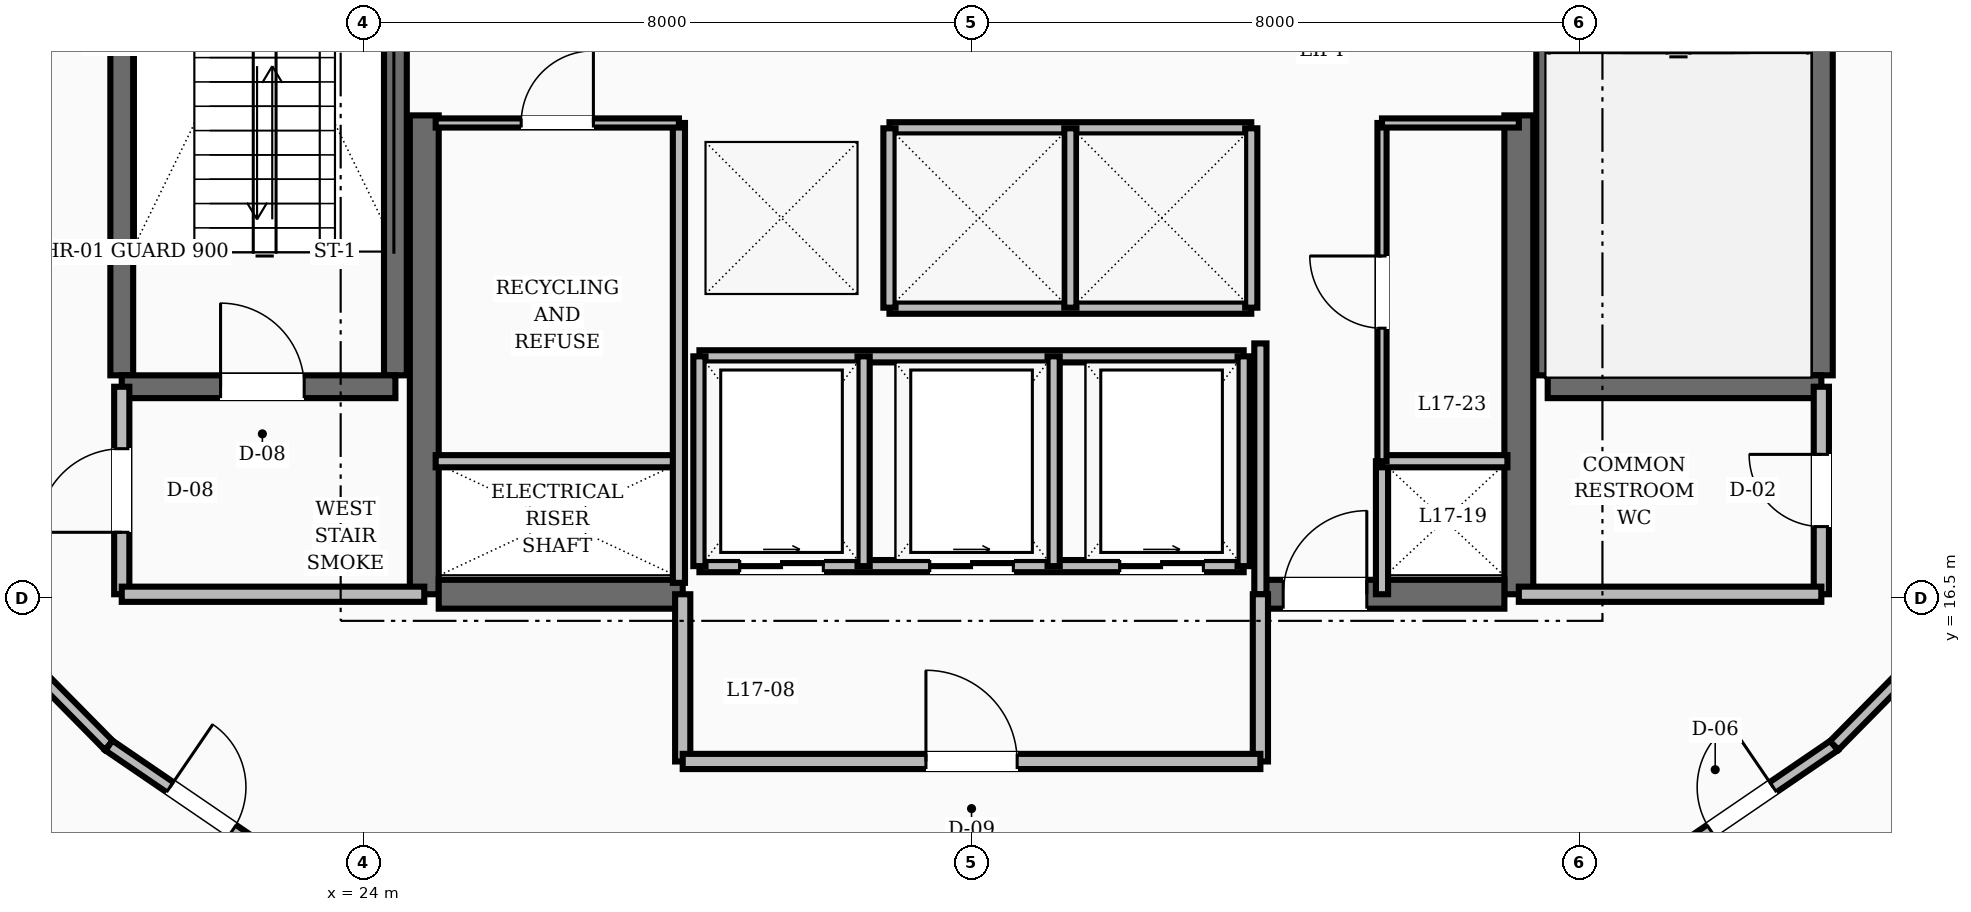
"""IFC4 building model, lengths in metres.
Left out: names, types, materials, properties, quantities, classifications, styles, units other than length and angle.
Written with IfcOpenShell. Run it as: python <this file> out.ifc"""

import sys

from ifc_helpers import new_model, si_unit, direction, frame, frame_2d, origin, place, context, subcontext, project, spatial, rectangle, extrude, element, fill, save


model = new_model("IFC4")
c1 = context("Model", 3, precision=1e-05, world=origin(), true_north=direction((0.0, 1.0)))
c2 = subcontext(c1, "Body", "Model", "MODEL_VIEW")
j1 = project(units=[si_unit("LENGTHUNIT", "METRE"), si_unit("PLANEANGLEUNIT", "RADIAN")], contexts=[c1])
p1 = place(None, origin())
s1 = spatial("IfcSite", under=j1, at=p1, CompositionType="ELEMENT")
p2 = place(p1, origin())
s2 = spatial("IfcBuilding", under=s1, at=p2, CompositionType="ELEMENT")
p3 = place(p2, frame((0.0, 0.0, 70.0)))
s3 = spatial("IfcBuildingStorey", under=s2, at=p3, CompositionType="ELEMENT", Elevation=70.0)
for number, where, z_axis, x_axis in (
    (1, (24.8, 16.55, 0.0), (0.0, 0.0, 1.0), (0.0, 1.0, 0.0)),
    (2, (39.2, 16.55, 0.0), (0.0, 0.0, 1.0), (0.0, 1.0, 0.0)),
):
    element("IfcWall", number, at=place(p3, frame(where, z_axis=z_axis, x_axis=x_axis)), inside=s3, PredefinedType="SHEAR", context=c2, shape_type="SweptSolid", body=[
        extrude(rectangle(XDim=6.3, YDim=0.38, at=frame_2d((3.15, 0.0))), origin(), (0.0, 0.0, 1.0), 3.6),
    ])
p4 = place(p3, frame((24.99, 16.55, 0.0), z_axis=(0.0, 0.0, 1.0), x_axis=(1.0, 0.0, 0.0)))
e3 = element("IfcWall", 3, at=p4, inside=s3, PredefinedType="SHEAR", context=c2, shape_type="SweptSolid", body=[
    extrude(rectangle(XDim=3.21, YDim=0.38, at=frame_2d((1.605, 0.0))), origin(), (0.0, 0.0, 1.0), 3.6),
])
p5 = place(p3, frame((35.8, 16.55, 0.0), z_axis=(0.0, 0.0, 1.0), x_axis=(1.0, 0.0, 0.0)))
e4 = element("IfcWall", 4, at=p5, inside=s3, PredefinedType="SHEAR", context=c2, shape_type="SweptSolid", body=[
    extrude(rectangle(XDim=3.21, YDim=0.38, at=frame_2d((1.605, 0.0))), origin(), (0.0, 0.0, 1.0), 3.6),
])
p6 = place(p5, frame((0.3, 0.0, 0.0)))
e5 = element("IfcOpeningElement", 5, at=p6, cuts=e4, PredefinedType="OPENING", context=c2, shape_type="SweptSolid", body=[
    extrude(rectangle(XDim=1.1, YDim=2.1, at=frame_2d((0.55, 1.05))), frame((0.0, 0.2, 0.0), z_axis=(0.0, -1.0, 0.0), x_axis=(1.0, 0.0, 0.0)), (0.0, 0.0, 1.0), 0.4),
])
for number, where, z_axis, x_axis in (
    (6, (20.82, 19.43, 0.0), (0.0, 0.0, 1.0), (0.0, 1.0, 0.0)),
    (7, (24.42, 19.43, 0.0), (0.0, 0.0, 1.0), (0.0, 1.0, 0.0)),
):
    element("IfcWall", number, at=place(p3, frame(where, z_axis=z_axis, x_axis=x_axis)), inside=s3, PredefinedType="SHEAR", context=c2, shape_type="SweptSolid", body=[
        extrude(rectangle(XDim=8.74, YDim=0.3, at=frame_2d((4.37, 0.0))), origin(), (0.0, 0.0, 1.0), 3.6),
    ])
p7 = place(p3, frame((20.82, 19.28, 0.0), z_axis=(0.0, 0.0, 1.0), x_axis=(1.0, 0.0, 0.0)))
e8 = element("IfcWall", 8, at=p7, inside=s3, PredefinedType="SHEAR", context=c2, shape_type="SweptSolid", body=[
    extrude(rectangle(XDim=3.6, YDim=0.3, at=frame_2d((1.8, 0.0))), origin(), (0.0, 0.0, 1.0), 3.6),
])
p8 = place(p7, frame((1.3, 0.0, 0.0)))
e9 = element("IfcOpeningElement", 9, at=p8, cuts=e8, PredefinedType="OPENING", context=c2, shape_type="SweptSolid", body=[
    extrude(rectangle(XDim=1.1, YDim=2.1, at=frame_2d((0.55, 1.05))), frame((0.0, 0.16, 0.0), z_axis=(0.0, -1.0, 0.0), x_axis=(1.0, 0.0, 0.0)), (0.0, 0.0, 1.0), 0.32),
])
for number, where, z_axis, x_axis in (
    (10, (43.18, 19.43, 0.0), (0.0, 0.0, 1.0), (0.0, 1.0, 0.0)),
    (11, (39.58, 19.43, 0.0), (0.0, 0.0, 1.0), (0.0, 1.0, 0.0)),
):
    element("IfcWall", number, at=place(p3, frame(where, z_axis=z_axis, x_axis=x_axis)), inside=s3, PredefinedType="SHEAR", context=c2, shape_type="SweptSolid", body=[
        extrude(rectangle(XDim=8.74, YDim=0.3, at=frame_2d((4.37, 0.0))), origin(), (0.0, 0.0, 1.0), 3.6),
    ])
p9 = place(p3, frame((39.58, 19.28, 0.0), z_axis=(0.0, 0.0, 1.0), x_axis=(1.0, 0.0, 0.0)))
e12 = element("IfcWall", 12, at=p9, inside=s3, PredefinedType="SHEAR", context=c2, shape_type="SweptSolid", body=[
    extrude(rectangle(XDim=3.6, YDim=0.3, at=frame_2d((1.8, 0.0))), origin(), (0.0, 0.0, 1.0), 3.6),
])
p10 = place(p3, frame((20.82, 16.55, 0.0), z_axis=(0.0, 0.0, 1.0), x_axis=(0.0, 1.0, 0.0)))
e13 = element("IfcWall", 13, at=p10, inside=s3, PredefinedType="SOLIDWALL", context=c2, shape_type="SweptSolid", body=[
    extrude(rectangle(XDim=2.73, YDim=0.2, at=frame_2d((1.365, 0.0))), origin(), (0.0, 0.0, 1.0), 2.71),
])
p11 = place(p10, frame((0.815, 0.0, 0.0)))
e14 = element("IfcOpeningElement", 14, at=p11, cuts=e13, PredefinedType="OPENING", context=c2, shape_type="SweptSolid", body=[
    extrude(rectangle(XDim=1.1, YDim=2.1, at=frame_2d((0.55, 1.05))), frame((0.0, 0.11, 0.0), z_axis=(0.0, -1.0, 0.0), x_axis=(1.0, 0.0, 0.0)), (0.0, 0.0, 1.0), 0.22),
])
p12 = place(p3, frame((20.82, 16.55, 0.0), z_axis=(0.0, 0.0, 1.0), x_axis=(1.0, 0.0, 0.0)))
e15 = element("IfcWall", 15, at=p12, inside=s3, PredefinedType="SOLIDWALL", context=c2, shape_type="SweptSolid", body=[
    extrude(rectangle(XDim=3.98, YDim=0.2, at=frame_2d((1.99, 0.0))), origin(), (0.0, 0.0, 1.0), 2.71),
])
p13 = place(p3, frame((43.18, 16.55, 0.0), z_axis=(0.0, 0.0, 1.0), x_axis=(0.0, 1.0, 0.0)))
e16 = element("IfcWall", 16, at=p13, inside=s3, PredefinedType="SOLIDWALL", context=c2, shape_type="SweptSolid", body=[
    extrude(rectangle(XDim=2.73, YDim=0.2, at=frame_2d((1.365, 0.0))), origin(), (0.0, 0.0, 1.0), 2.71),
])
p14 = place(p13, frame((0.89, 0.0, 0.0)))
e17 = element("IfcOpeningElement", 17, at=p14, cuts=e16, PredefinedType="OPENING", context=c2, shape_type="SweptSolid", body=[
    extrude(rectangle(XDim=0.95, YDim=2.1, at=frame_2d((0.475, 1.05))), frame((0.0, 0.11, 0.0), z_axis=(0.0, -1.0, 0.0), x_axis=(1.0, 0.0, 0.0)), (0.0, 0.0, 1.0), 0.22),
])
p15 = place(p3, frame((39.2, 16.55, 0.0), z_axis=(0.0, 0.0, 1.0), x_axis=(1.0, 0.0, 0.0)))
e18 = element("IfcWall", 18, at=p15, inside=s3, PredefinedType="SOLIDWALL", context=c2, shape_type="SweptSolid", body=[
    extrude(rectangle(XDim=3.98, YDim=0.2, at=frame_2d((1.99, 0.0))), origin(), (0.0, 0.0, 1.0), 2.71),
])
p16 = place(p3, frame((35.8, 16.55, 0.0), z_axis=(0.0, 0.0, 1.0), x_axis=(0.0, 1.0, 0.0)))
e19 = element("IfcWall", 19, at=p16, inside=s3, PredefinedType="SOLIDWALL", context=c2, shape_type="SweptSolid", body=[
    extrude(rectangle(XDim=3.3, YDim=0.16, at=frame_2d((1.65, 0.0))), origin(), (0.0, 0.0, 1.0), 2.71),
])
p17 = place(p3, frame((37.4, 16.55, 0.0), z_axis=(0.0, 0.0, 1.0), x_axis=(0.0, 1.0, 0.0)))
e20 = element("IfcWall", 20, at=p17, inside=s3, PredefinedType="SOLIDWALL", context=c2, shape_type="SweptSolid", body=[
    extrude(rectangle(XDim=1.75, YDim=0.16, at=frame_2d((0.875, 0.0))), origin(), (0.0, 0.0, 1.0), 2.71),
])
for number, where, z_axis, x_axis in (
    (21, (28.2, 14.35, 0.0), (0.0, 0.0, 1.0), (0.0, 1.0, 0.0)),
    (22, (35.8, 14.35, 0.0), (0.0, 0.0, 1.0), (0.0, 1.0, 0.0)),
):
    element("IfcWall", number, at=place(p3, frame(where, z_axis=z_axis, x_axis=x_axis)), inside=s3, PredefinedType="SOLIDWALL", context=c2, shape_type="SweptSolid", body=[
        extrude(rectangle(XDim=2.2, YDim=0.2, at=frame_2d((1.1, 0.0))), origin(), (0.0, 0.0, 1.0), 2.71),
    ])
p18 = place(p3, frame((28.2, 14.35, 0.0), z_axis=(0.0, 0.0, 1.0), x_axis=(1.0, 0.0, 0.0)))
e23 = element("IfcWall", 23, at=p18, inside=s3, PredefinedType="SOLIDWALL", context=c2, shape_type="SweptSolid", body=[
    extrude(rectangle(XDim=7.6, YDim=0.2, at=frame_2d((3.8, 0.0))), origin(), (0.0, 0.0, 1.0), 2.71),
])
p19 = place(p18, frame((3.2, 0.0, 0.0)))
e24 = element("IfcOpeningElement", 24, at=p19, cuts=e23, PredefinedType="OPENING", context=c2, shape_type="SweptSolid", body=[
    extrude(rectangle(XDim=1.2, YDim=2.1, at=frame_2d((0.6, 1.05))), frame((0.0, 0.11, 0.0), z_axis=(0.0, -1.0, 0.0), x_axis=(1.0, 0.0, 0.0)), (0.0, 0.0, 1.0), 0.22),
])
for number, where, z_axis, x_axis in (
    (25, (30.92, 22.68, 0.0), (0.0, 0.0, 1.0), (1.0, 0.0, 0.0)),
    (26, (30.92, 20.32, 0.0), (0.0, 0.0, 1.0), (1.0, 0.0, 0.0)),
):
    element("IfcWall", number, at=place(p3, frame(where, z_axis=z_axis, x_axis=x_axis)), inside=s3, PredefinedType="SOLIDWALL", context=c2, shape_type="SweptSolid", body=[
        extrude(rectangle(XDim=4.76, YDim=0.16, at=frame_2d((2.38, 0.0))), origin(), (0.0, 0.0, 1.0), 2.71),
    ])
for number, where, z_axis, x_axis in (
    (27, (30.92, 20.32, 0.0), (0.0, 0.0, 1.0), (0.0, 1.0, 0.0)),
    (28, (33.3, 20.32, 0.0), (0.0, 0.0, 1.0), (0.0, 1.0, 0.0)),
    (29, (35.68, 20.32, 0.0), (0.0, 0.0, 1.0), (0.0, 1.0, 0.0)),
):
    element("IfcWall", number, at=place(p3, frame(where, z_axis=z_axis, x_axis=x_axis)), inside=s3, PredefinedType="SOLIDWALL", context=c2, shape_type="SweptSolid", body=[
        extrude(rectangle(XDim=2.36, YDim=0.16, at=frame_2d((1.18, 0.0))), origin(), (0.0, 0.0, 1.0), 2.71),
    ])
p20 = place(p3, frame((28.42, 16.92, 0.0), z_axis=(0.0, 0.0, 1.0), x_axis=(1.0, 0.0, 0.0)))
e30 = element("IfcWall", 30, at=p20, inside=s3, PredefinedType="SOLIDWALL", context=c2, shape_type="SweptSolid", body=[
    extrude(rectangle(XDim=7.16, YDim=0.16, at=frame_2d((3.58, 0.0))), origin(), (0.0, 0.0, 1.0), 2.71),
])
p21 = place(p20, frame((0.53, 0.0, 0.0)))
e31 = element("IfcOpeningElement", 31, at=p21, cuts=e30, PredefinedType="OPENING", context=c2, shape_type="SweptSolid", body=[
    extrude(rectangle(XDim=1.1, YDim=2.15, at=frame_2d((0.55, 1.075))), frame((0.0, 0.09, 0.0), z_axis=(0.0, -1.0, 0.0), x_axis=(1.0, 0.0, 0.0)), (0.0, 0.0, 1.0), 0.18),
])
p22 = place(p20, frame((3.03, 0.0, 0.0)))
e32 = element("IfcOpeningElement", 32, at=p22, cuts=e30, PredefinedType="OPENING", context=c2, shape_type="SweptSolid", body=[
    extrude(rectangle(XDim=1.1, YDim=2.15, at=frame_2d((0.55, 1.075))), frame((0.0, 0.09, 0.0), z_axis=(0.0, -1.0, 0.0), x_axis=(1.0, 0.0, 0.0)), (0.0, 0.0, 1.0), 0.18),
])
p23 = place(p20, frame((5.53, 0.0, 0.0)))
e33 = element("IfcOpeningElement", 33, at=p23, cuts=e30, PredefinedType="OPENING", context=c2, shape_type="SweptSolid", body=[
    extrude(rectangle(XDim=1.1, YDim=2.15, at=frame_2d((0.55, 1.075))), frame((0.0, 0.09, 0.0), z_axis=(0.0, -1.0, 0.0), x_axis=(1.0, 0.0, 0.0)), (0.0, 0.0, 1.0), 0.18),
])
p24 = place(p3, frame((28.42, 19.68, 0.0), z_axis=(0.0, 0.0, 1.0), x_axis=(1.0, 0.0, 0.0)))
e34 = element("IfcWall", 34, at=p24, inside=s3, PredefinedType="SOLIDWALL", context=c2, shape_type="SweptSolid", body=[
    extrude(rectangle(XDim=7.16, YDim=0.16, at=frame_2d((3.58, 0.0))), origin(), (0.0, 0.0, 1.0), 2.71),
])
for number, where, z_axis, x_axis in (
    (35, (28.42, 16.92, 0.0), (0.0, 0.0, 1.0), (0.0, 1.0, 0.0)),
    (36, (30.58, 16.92, 0.0), (0.0, 0.0, 1.0), (0.0, 1.0, 0.0)),
    (37, (33.08, 16.92, 0.0), (0.0, 0.0, 1.0), (0.0, 1.0, 0.0)),
    (38, (35.58, 16.92, 0.0), (0.0, 0.0, 1.0), (0.0, 1.0, 0.0)),
):
    element("IfcWall", number, at=place(p3, frame(where, z_axis=z_axis, x_axis=x_axis)), inside=s3, PredefinedType="SOLIDWALL", context=c2, shape_type="SweptSolid", body=[
        extrude(rectangle(XDim=2.76, YDim=0.16, at=frame_2d((1.38, 0.0))), origin(), (0.0, 0.0, 1.0), 2.71),
    ])
p25 = place(p3, frame((24.95, 18.3, 0.0), z_axis=(0.0, 0.0, 1.0), x_axis=(1.0, 0.0, 0.0)))
e39 = element("IfcWall", 39, at=p25, inside=s3, PredefinedType="SOLIDWALL", context=c2, shape_type="SweptSolid", body=[
    extrude(rectangle(XDim=3.2, YDim=0.16, at=frame_2d((1.6, 0.0))), origin(), (0.0, 0.0, 1.0), 2.71),
])
p26 = place(p3, frame((28.15, 16.7, 0.0), z_axis=(0.0, 0.0, 1.0), x_axis=(0.0, 1.0, 0.0)))
e40 = element("IfcWall", 40, at=p26, inside=s3, PredefinedType="SOLIDWALL", context=c2, shape_type="SweptSolid", body=[
    extrude(rectangle(XDim=6.05, YDim=0.16, at=frame_2d((3.025, 0.0))), origin(), (0.0, 0.0, 1.0), 2.71),
])
p27 = place(p3, frame((37.4, 18.3, 0.0), z_axis=(0.0, 0.0, 1.0), x_axis=(1.0, 0.0, 0.0)))
e41 = element("IfcWall", 41, at=p27, inside=s3, PredefinedType="SOLIDWALL", context=c2, shape_type="SweptSolid", body=[
    extrude(rectangle(XDim=1.65, YDim=0.16, at=frame_2d((0.825, 0.0))), origin(), (0.0, 0.0, 1.0), 2.71),
])
p28 = place(p3, frame((24.95, 22.75, 0.0), z_axis=(0.0, 0.0, 1.0), x_axis=(1.0, 0.0, 0.0)))
e42 = element("IfcWall", 42, at=p28, inside=s3, PredefinedType="PARTITIONING", context=c2, shape_type="SweptSolid", body=[
    extrude(rectangle(XDim=3.2, YDim=0.12, at=frame_2d((1.6, 0.0))), origin(), (0.0, 0.0, 1.0), 2.71),
])
p29 = place(p28, frame((1.125, 0.0, 0.0)))
e43 = element("IfcOpeningElement", 43, at=p29, cuts=e42, PredefinedType="OPENING", context=c2, shape_type="SweptSolid", body=[
    extrude(rectangle(XDim=0.95, YDim=2.1, at=frame_2d((0.475, 1.05))), frame((0.0, 0.07, 0.0), z_axis=(0.0, -1.0, 0.0), x_axis=(1.0, 0.0, 0.0)), (0.0, 0.0, 1.0), 0.14),
])
p30 = place(p3, frame((37.4, 18.3, 0.0), z_axis=(0.0, 0.0, 1.0), x_axis=(0.0, 1.0, 0.0)))
e44 = element("IfcWall", 44, at=p30, inside=s3, PredefinedType="PARTITIONING", context=c2, shape_type="SweptSolid", body=[
    extrude(rectangle(XDim=4.45, YDim=0.12, at=frame_2d((2.225, 0.0))), origin(), (0.0, 0.0, 1.0), 2.71),
])
p31 = place(p30, frame((1.75, 0.0, 0.0)))
e45 = element("IfcOpeningElement", 45, at=p31, cuts=e44, PredefinedType="OPENING", context=c2, shape_type="SweptSolid", body=[
    extrude(rectangle(XDim=0.95, YDim=2.1, at=frame_2d((0.475, 1.05))), frame((0.0, 0.07, 0.0), z_axis=(0.0, -1.0, 0.0), x_axis=(1.0, 0.0, 0.0)), (0.0, 0.0, 1.0), 0.14),
])
p32 = place(p3, frame((37.4, 22.75, 0.0), z_axis=(0.0, 0.0, 1.0), x_axis=(1.0, 0.0, 0.0)))
e46 = element("IfcWall", 46, at=p32, inside=s3, PredefinedType="PARTITIONING", context=c2, shape_type="SweptSolid", body=[
    extrude(rectangle(XDim=1.8, YDim=0.12, at=frame_2d((0.9, 0.0))), origin(), (0.0, 0.0, 1.0), 2.71),
])
p33 = place(p3, frame((18.655, 16.583, 0.0), z_axis=(0.0, 0.0, 1.0), x_axis=(0.702366174226, -0.711815816981, 0.0)))
e47 = element("IfcWall", 47, at=p33, inside=s3, PredefinedType="SOLIDWALL", context=c2, shape_type="SweptSolid", body=[
    extrude(rectangle(XDim=2.842, YDim=0.16, at=frame_2d((1.421, 0.0))), origin(), (0.0, 0.0, 1.0), 2.71),
])
p34 = place(p3, frame((20.651, 14.56, 0.0), z_axis=(0.0, 0.0, 1.0), x_axis=(0.825929039072, -0.563774088104, 0.0)))
e48 = element("IfcWall", 48, at=p34, inside=s3, PredefinedType="SOLIDWALL", context=c2, shape_type="SweptSolid", body=[
    extrude(rectangle(XDim=2.945, YDim=0.16, at=frame_2d((1.472, 0.0))), origin(), (0.0, 0.0, 1.0), 2.71),
])
p35 = place(p34, frame((0.972, 0.0, 0.0)))
e49 = element("IfcOpeningElement", 49, at=p35, cuts=e48, PredefinedType="OPENING", context=c2, shape_type="SweptSolid", body=[
    extrude(rectangle(XDim=1.0, YDim=2.1, at=frame_2d((0.5, 1.05))), frame((0.0, 0.09, 0.0), z_axis=(0.0, -1.0, 0.0), x_axis=(1.0, 0.0, 0.0)), (0.0, 0.0, 1.0), 0.18),
])
p36 = place(p3, frame((40.917, 12.9, 0.0), z_axis=(0.0, 0.0, 1.0), x_axis=(0.825929039072, 0.563774088104, 0.0)))
e50 = element("IfcWall", 50, at=p36, inside=s3, PredefinedType="SOLIDWALL", context=c2, shape_type="SweptSolid", body=[
    extrude(rectangle(XDim=2.945, YDim=0.16, at=frame_2d((1.472, 0.0))), origin(), (0.0, 0.0, 1.0), 2.71),
])
p37 = place(p36, frame((0.972, 0.0, 0.0)))
e51 = element("IfcOpeningElement", 51, at=p37, cuts=e50, PredefinedType="OPENING", context=c2, shape_type="SweptSolid", body=[
    extrude(rectangle(XDim=1.0, YDim=2.1, at=frame_2d((0.5, 1.05))), frame((0.0, 0.09, 0.0), z_axis=(0.0, -1.0, 0.0), x_axis=(1.0, 0.0, 0.0)), (0.0, 0.0, 1.0), 0.18),
])
p38 = place(p3, frame((43.349, 14.56, 0.0), z_axis=(0.0, 0.0, 1.0), x_axis=(0.702366174226, 0.711815816981, 0.0)))
e52 = element("IfcWall", 52, at=p38, inside=s3, PredefinedType="SOLIDWALL", context=c2, shape_type="SweptSolid", body=[
    extrude(rectangle(XDim=2.842, YDim=0.16, at=frame_2d((1.421, 0.0))), origin(), (0.0, 0.0, 1.0), 2.71),
])
p39 = place(p8, origin())
e53 = element("IfcDoor", 53, at=p39, inside=s3, OperationType="SINGLE_SWING_LEFT", PredefinedType="DOOR", context=c2, shape_type="SweptSolid", body=[
    extrude(rectangle(XDim=1.1, YDim=2.1, at=frame_2d((0.55, 1.05))), frame((0.0, 0.025, 0.0), z_axis=(0.0, -1.0, 0.0), x_axis=(1.0, 0.0, 0.0)), (0.0, 0.0, 1.0), 0.05),
])
fill(e9, e53)
p40 = place(p11, origin())
e54 = element("IfcDoor", 54, at=p40, inside=s3, OperationType="SINGLE_SWING_LEFT", PredefinedType="DOOR", context=c2, shape_type="SweptSolid", body=[
    extrude(rectangle(XDim=1.1, YDim=2.1, at=frame_2d((0.55, 1.05))), frame((0.0, 0.025, 0.0), z_axis=(0.0, -1.0, 0.0), x_axis=(1.0, 0.0, 0.0)), (0.0, 0.0, 1.0), 0.05),
])
fill(e14, e54)
p41 = place(p14, origin())
e55 = element("IfcDoor", 55, at=p41, inside=s3, OperationType="SINGLE_SWING_RIGHT", PredefinedType="DOOR", context=c2, shape_type="SweptSolid", body=[
    extrude(rectangle(XDim=0.95, YDim=2.1, at=frame_2d((0.475, 1.05))), frame((0.0, 0.025, 0.0), z_axis=(0.0, -1.0, 0.0), x_axis=(1.0, 0.0, 0.0)), (0.0, 0.0, 1.0), 0.05),
])
fill(e17, e55)
p42 = place(p6, origin())
e56 = element("IfcDoor", 56, at=p42, inside=s3, OperationType="SINGLE_SWING_RIGHT", PredefinedType="DOOR", context=c2, shape_type="SweptSolid", body=[
    extrude(rectangle(XDim=1.1, YDim=2.1, at=frame_2d((0.55, 1.05))), frame((0.0, 0.025, 0.0), z_axis=(0.0, -1.0, 0.0), x_axis=(1.0, 0.0, 0.0)), (0.0, 0.0, 1.0), 0.05),
])
fill(e5, e56)
p43 = place(p19, origin())
e57 = element("IfcDoor", 57, at=p43, inside=s3, OperationType="SINGLE_SWING_LEFT", PredefinedType="DOOR", context=c2, shape_type="SweptSolid", body=[
    extrude(rectangle(XDim=1.2, YDim=2.1, at=frame_2d((0.6, 1.05))), frame((0.0, 0.025, 0.0), z_axis=(0.0, -1.0, 0.0), x_axis=(1.0, 0.0, 0.0)), (0.0, 0.0, 1.0), 0.05),
])
fill(e24, e57)
p44 = place(p21, origin())
e58 = element("IfcDoor", 58, at=p44, inside=s3, OperationType="SLIDING_TO_RIGHT", PredefinedType="DOOR", context=c2, shape_type="SweptSolid", body=[
    extrude(rectangle(XDim=1.1, YDim=2.15, at=frame_2d((0.55, 1.075))), frame((0.0, 0.025, 0.0), z_axis=(0.0, -1.0, 0.0), x_axis=(1.0, 0.0, 0.0)), (0.0, 0.0, 1.0), 0.05),
])
fill(e31, e58)
p45 = place(p22, origin())
e59 = element("IfcDoor", 59, at=p45, inside=s3, OperationType="SLIDING_TO_RIGHT", PredefinedType="DOOR", context=c2, shape_type="SweptSolid", body=[
    extrude(rectangle(XDim=1.1, YDim=2.15, at=frame_2d((0.55, 1.075))), frame((0.0, 0.025, 0.0), z_axis=(0.0, -1.0, 0.0), x_axis=(1.0, 0.0, 0.0)), (0.0, 0.0, 1.0), 0.05),
])
fill(e32, e59)
p46 = place(p23, origin())
e60 = element("IfcDoor", 60, at=p46, inside=s3, OperationType="SLIDING_TO_RIGHT", PredefinedType="DOOR", context=c2, shape_type="SweptSolid", body=[
    extrude(rectangle(XDim=1.1, YDim=2.15, at=frame_2d((0.55, 1.075))), frame((0.0, 0.025, 0.0), z_axis=(0.0, -1.0, 0.0), x_axis=(1.0, 0.0, 0.0)), (0.0, 0.0, 1.0), 0.05),
])
fill(e33, e60)
p47 = place(p29, origin())
e61 = element("IfcDoor", 61, at=p47, inside=s3, OperationType="SINGLE_SWING_RIGHT", PredefinedType="DOOR", context=c2, shape_type="SweptSolid", body=[
    extrude(rectangle(XDim=0.95, YDim=2.1, at=frame_2d((0.475, 1.05))), frame((0.0, 0.025, 0.0), z_axis=(0.0, -1.0, 0.0), x_axis=(1.0, 0.0, 0.0)), (0.0, 0.0, 1.0), 0.05),
])
fill(e43, e61)
p48 = place(p31, origin())
e62 = element("IfcDoor", 62, at=p48, inside=s3, OperationType="SINGLE_SWING_RIGHT", PredefinedType="DOOR", context=c2, shape_type="SweptSolid", body=[
    extrude(rectangle(XDim=0.95, YDim=2.1, at=frame_2d((0.475, 1.05))), frame((0.0, 0.025, 0.0), z_axis=(0.0, -1.0, 0.0), x_axis=(1.0, 0.0, 0.0)), (0.0, 0.0, 1.0), 0.05),
])
fill(e45, e62)
p49 = place(p37, origin())
e63 = element("IfcDoor", 63, at=p49, inside=s3, OperationType="SINGLE_SWING_RIGHT", PredefinedType="DOOR", context=c2, shape_type="SweptSolid", body=[
    extrude(rectangle(XDim=1.0, YDim=2.1, at=frame_2d((0.5, 1.05))), frame((0.0, 0.025, 0.0), z_axis=(0.0, -1.0, 0.0), x_axis=(1.0, 0.0, 0.0)), (0.0, 0.0, 1.0), 0.05),
])
fill(e51, e63)
p50 = place(p35, origin())
e64 = element("IfcDoor", 64, at=p50, inside=s3, OperationType="SINGLE_SWING_LEFT", PredefinedType="DOOR", context=c2, shape_type="SweptSolid", body=[
    extrude(rectangle(XDim=1.0, YDim=2.1, at=frame_2d((0.5, 1.05))), frame((0.0, 0.025, 0.0), z_axis=(0.0, -1.0, 0.0), x_axis=(1.0, 0.0, 0.0)), (0.0, 0.0, 1.0), 0.05),
])
fill(e49, e64)
save(model, sys.argv[1])
